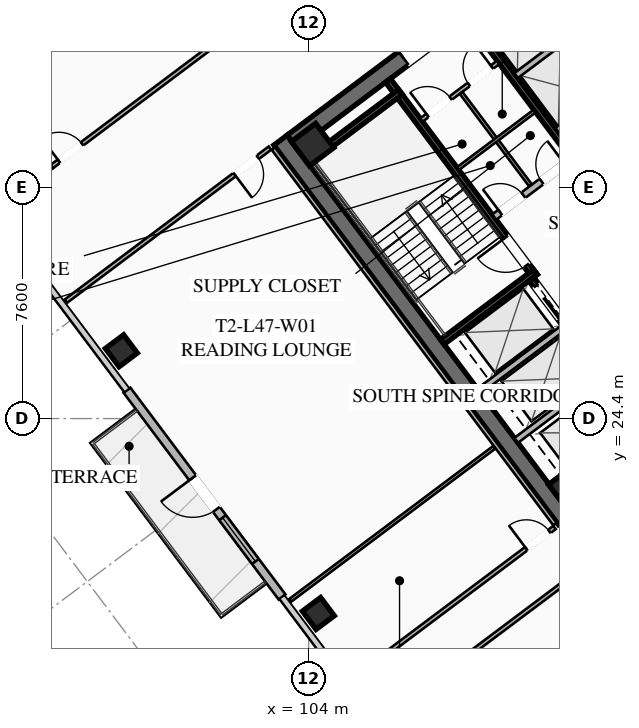
"""IFC4 building model, lengths in metres.
Left out: names, types, materials, properties, quantities, classifications, styles, units other than length and angle.
Written with IfcOpenShell. Run it as: python <this file> out.ifc"""

import sys

from ifc_helpers import new_model, si_unit, direction, frame, frame_2d, origin, origin_2d, place, context, subcontext, project, spatial, rectangle, hollow_rectangle, extrude, element, fill, save


model = new_model("IFC4")
c1 = context("Model", 3, precision=1e-05, world=origin(), true_north=direction((0.0, 1.0)))
c2 = subcontext(c1, "Body", "Model", "MODEL_VIEW")
j1 = project(units=[si_unit("LENGTHUNIT", "METRE"), si_unit("PLANEANGLEUNIT", "RADIAN")], contexts=[c1])
p1 = place(None, origin())
s1 = spatial("IfcSite", under=j1, at=p1, CompositionType="ELEMENT")
p2 = place(p1, origin())
s2 = spatial("IfcBuilding", under=s1, at=p2, CompositionType="ELEMENT")
p3 = place(p2, frame((0.0, 0.0, 174.75)))
s3 = spatial("IfcBuildingStorey", under=s2, at=p3, CompositionType="ELEMENT", Elevation=174.75)
p4 = place(p3, frame((112.436, 21.077, 0.0), z_axis=(0.0, 0.0, 1.0), x_axis=(-0.600005007985, 0.799996243986, 0.0)))
e1 = element("IfcWall", 1, at=p4, inside=s3, PredefinedType="SHEAR", context=c2, shape_type="SweptSolid", body=[
    extrude(rectangle(XDim=15.6, YDim=0.55, at=frame_2d((7.8, 0.0))), origin(), (0.0, 0.0, 1.0), 3.55),
])
p5 = place(p3, frame((103.461, 33.502, 0.0), z_axis=(0.0, 0.0, 1.0), x_axis=(0.799998054672, 0.600002593761, 0.0)))
e2 = element("IfcWall", 2, at=p5, inside=s3, PredefinedType="SHEAR", context=c2, shape_type="SweptSolid", body=[
    extrude(rectangle(XDim=15.06, YDim=0.55, at=frame_2d((7.53, 0.0))), origin(), (0.0, 0.0, 1.0), 3.55),
])
p6 = place(p5, frame((4.58, 0.0, 0.0)))
e3 = element("IfcOpeningElement", 3, at=p6, cuts=e2, PredefinedType="OPENING", context=c2, shape_type="SweptSolid", body=[
    extrude(rectangle(XDim=1.25, YDim=2.25, at=frame_2d((0.625, 1.125))), frame((0.0, 0.285, 0.0), z_axis=(0.0, -1.0, 0.0), x_axis=(1.0, 0.0, 0.0)), (0.0, 0.0, 1.0), 0.57),
])
p7 = place(p5, frame((9.63, 0.0, 0.0)))
e4 = element("IfcOpeningElement", 4, at=p7, cuts=e2, PredefinedType="OPENING", context=c2, shape_type="SweptSolid", body=[
    extrude(rectangle(XDim=1.25, YDim=2.25, at=frame_2d((0.625, 1.125))), frame((0.0, 0.285, 0.0), z_axis=(0.0, -1.0, 0.0), x_axis=(1.0, 0.0, 0.0)), (0.0, 0.0, 1.0), 0.57),
])
for number, where, z_axis, x_axis in (
    (5, (112.59, 22.13, 0.0), (0.0, 0.0, 1.0), (0.8, 0.6, 0.0)),
    (6, (104.13, 33.41, 0.0), (0.0, 0.0, 1.0), (0.8, 0.6, 0.0)),
):
    element("IfcColumn", number, at=place(p3, frame(where, z_axis=z_axis, x_axis=x_axis)), inside=s3, PredefinedType="COLUMN", context=c2, shape_type="SweptSolid", body=[
        extrude(hollow_rectangle(XDim=1.0, YDim=1.0, WallThickness=0.04, at=origin_2d()), origin(), (0.0, 0.0, 1.0), 3.37),
    ])
for number, where, z_axis, x_axis in (
    (7, (97.84, 26.63, 0.0), (0.0, 0.0, 1.0), (0.8, 0.6, 0.0)),
    (8, (104.32, 17.99, 0.0), (0.0, 0.0, 1.0), (0.8, 0.6, 0.0)),
):
    element("IfcColumn", number, at=place(p3, frame(where, z_axis=z_axis, x_axis=x_axis)), inside=s3, PredefinedType="COLUMN", context=c2, shape_type="SweptSolid", body=[
        extrude(hollow_rectangle(XDim=0.75, YDim=0.75, WallThickness=0.032, at=origin_2d()), origin(), (0.0, 0.0, 1.0), 3.37),
    ])
p8 = place(p3, frame((103.126, 18.532, 0.0), z_axis=(0.0, 0.0, 1.0), x_axis=(-0.600004595526, 0.799996553335, 0.0)))
e9 = element("IfcWall", 9, at=p8, inside=s3, PredefinedType="SOLIDWALL", context=c2, shape_type="SweptSolid", body=[
    extrude(rectangle(XDim=8.5, YDim=0.28, at=frame_2d((4.25, 0.0))), origin(), (0.0, 0.0, 1.0), 3.37),
])
p9 = place(p8, frame((3.6, 0.0, 0.0)))
e10 = element("IfcOpeningElement", 10, at=p9, cuts=e9, PredefinedType="OPENING", context=c2, shape_type="SweptSolid", body=[
    extrude(rectangle(XDim=1.3, YDim=2.15, at=frame_2d((0.65, 1.075))), frame((0.0, 0.15, 0.0), z_axis=(0.0, -1.0, 0.0), x_axis=(1.0, 0.0, 0.0)), (0.0, 0.0, 1.0), 0.3),
])
p10 = place(p8, frame((1.46, 0.0, 0.85)))
e11 = element("IfcOpeningElement", 11, at=p10, cuts=e9, PredefinedType="OPENING", context=c2, shape_type="SweptSolid", body=[
    extrude(rectangle(XDim=1.8, YDim=1.92, at=frame_2d((0.9, 0.96))), frame((0.0, 0.15, 0.0), z_axis=(0.0, -1.0, 0.0), x_axis=(1.0, 0.0, 0.0)), (0.0, 0.0, 1.0), 0.3),
])
p11 = place(p3, frame((111.44, 29.08, 0.0), z_axis=(0.0, 0.0, 1.0), x_axis=(-0.59999029481, 0.8000072788, 0.0)))
e12 = element("IfcWall", 12, at=p11, inside=s3, PredefinedType="SHEAR", context=c2, shape_type="SweptSolid", body=[
    extrude(rectangle(XDim=8.05, YDim=0.2, at=frame_2d((4.025, 0.0))), origin(), (0.0, 0.0, 1.0), 3.37),
])
p12 = place(p11, frame((0.45, 0.0, 0.0)))
e13 = element("IfcOpeningElement", 13, at=p12, cuts=e12, PredefinedType="OPENING", context=c2, shape_type="SweptSolid", body=[
    extrude(rectangle(XDim=1.15, YDim=2.2, at=frame_2d((0.575, 1.1))), frame((0.0, 0.11, 0.0), z_axis=(0.0, -1.0, 0.0), x_axis=(1.0, 0.0, 0.0)), (0.0, 0.0, 1.0), 0.22),
])
for number, where, z_axis, x_axis in (
    (14, (108.396, 26.922, 0.0), (0.0, 0.0, 1.0), (0.8, 0.6, 0.0)),
    (15, (103.956, 32.842, 0.0), (0.0, 0.0, 1.0), (0.8, 0.6, 0.0)),
):
    element("IfcWall", number, at=place(p3, frame(where, z_axis=z_axis, x_axis=x_axis)), inside=s3, PredefinedType="SHEAR", context=c2, shape_type="SweptSolid", body=[
        extrude(rectangle(XDim=3.83, YDim=0.2, at=frame_2d((1.915, 0.0))), origin(), (0.0, 0.0, 1.0), 3.37),
    ])
p13 = place(p3, frame((117.998, 25.936, 0.0), z_axis=(0.0, 0.0, 1.0), x_axis=(-0.600002693989, 0.799997979501, 0.0)))
e16 = element("IfcWall", 16, at=p13, inside=s3, PredefinedType="SHEAR", context=c2, shape_type="SweptSolid", body=[
    extrude(rectangle(XDim=14.5, YDim=0.2, at=frame_2d((7.25, 0.0))), origin(), (0.0, 0.0, 1.0), 3.37),
])
p14 = place(p3, frame((110.104, 31.028, 0.0), z_axis=(0.0, 0.0, 1.0), x_axis=(0.800018601094, 0.59997519774, 0.0)))
e17 = element("IfcWall", 17, at=p14, inside=s3, PredefinedType="SOLIDWALL", context=c2, shape_type="SweptSolid", body=[
    extrude(rectangle(XDim=3.15, YDim=0.22, at=frame_2d((1.575, 0.0))), origin(), (0.0, 0.0, 1.0), 2.723),
])
p15 = place(p14, frame((0.25, 0.0, 0.0)))
e18 = element("IfcOpeningElement", 18, at=p15, cuts=e17, PredefinedType="OPENING", context=c2, shape_type="SweptSolid", body=[
    extrude(rectangle(XDim=0.95, YDim=2.05, at=frame_2d((0.475, 1.025))), frame((0.0, 0.12, 0.0), z_axis=(0.0, -1.0, 0.0), x_axis=(1.0, 0.0, 0.0)), (0.0, 0.0, 1.0), 0.24),
])
p16 = place(p14, frame((1.95, 0.0, 0.0)))
e19 = element("IfcOpeningElement", 19, at=p16, cuts=e17, PredefinedType="OPENING", context=c2, shape_type="SweptSolid", body=[
    extrude(rectangle(XDim=0.95, YDim=2.05, at=frame_2d((0.475, 1.025))), frame((0.0, 0.12, 0.0), z_axis=(0.0, -1.0, 0.0), x_axis=(1.0, 0.0, 0.0)), (0.0, 0.0, 1.0), 0.24),
])
p17 = place(p3, frame((115.19, 23.83, 0.0), z_axis=(0.0, 0.0, 1.0), x_axis=(-0.599993943644, 0.800004542231, 0.0)))
e20 = element("IfcWall", 20, at=p17, inside=s3, PredefinedType="SHEAR", context=c2, shape_type="SweptSolid", body=[
    extrude(rectangle(XDim=6.45, YDim=0.2, at=frame_2d((3.225, 0.0))), origin(), (0.0, 0.0, 1.0), 3.37),
])
p18 = place(p17, frame((4.875, 0.0, 0.0)))
e21 = element("IfcOpeningElement", 21, at=p18, cuts=e20, PredefinedType="OPENING", context=c2, shape_type="SweptSolid", body=[
    extrude(rectangle(XDim=1.3, YDim=2.25, at=frame_2d((0.65, 1.125))), frame((0.0, 0.11, 0.0), z_axis=(0.0, -1.0, 0.0), x_axis=(1.0, 0.0, 0.0)), (0.0, 0.0, 1.0), 0.22),
])
p19 = place(p17, frame((2.875, 0.0, 0.0)))
e22 = element("IfcOpeningElement", 22, at=p19, cuts=e20, PredefinedType="OPENING", context=c2, shape_type="SweptSolid", body=[
    extrude(rectangle(XDim=1.3, YDim=2.25, at=frame_2d((0.65, 1.125))), frame((0.0, 0.11, 0.0), z_axis=(0.0, -1.0, 0.0), x_axis=(1.0, 0.0, 0.0)), (0.0, 0.0, 1.0), 0.22),
])
p20 = place(p17, frame((0.675, 0.0, 0.0)))
e23 = element("IfcOpeningElement", 23, at=p20, cuts=e20, PredefinedType="OPENING", context=c2, shape_type="SweptSolid", body=[
    extrude(rectangle(XDim=1.3, YDim=2.25, at=frame_2d((0.65, 1.125))), frame((0.0, 0.11, 0.0), z_axis=(0.0, -1.0, 0.0), x_axis=(1.0, 0.0, 0.0)), (0.0, 0.0, 1.0), 0.22),
])
for number, where, z_axis, x_axis in (
    (24, (110.826, 23.682, 0.0), (0.0, 0.0, 1.0), (0.8, 0.6, 0.0)),
    (25, (109.608, 25.306, 0.0), (0.0, 0.0, 1.0), (0.8, 0.6, 0.0)),
):
    element("IfcWall", number, at=place(p3, frame(where, z_axis=z_axis, x_axis=x_axis)), inside=s3, PredefinedType="SOLIDWALL", context=c2, shape_type="SweptSolid", body=[
        extrude(rectangle(XDim=3.48, YDim=0.2, at=frame_2d((1.74, 0.0))), origin(), (0.0, 0.0, 1.0), 3.37),
    ])
p21 = place(p3, frame((107.71, 34.22, 0.0), z_axis=(0.0, 0.0, 1.0), x_axis=(0.799981399002, 0.60002480053, 0.0)))
e26 = element("IfcWall", 26, at=p21, inside=s3, PredefinedType="PARTITIONING", context=c2, shape_type="SweptSolid", body=[
    extrude(rectangle(XDim=3.15, YDim=0.135, at=frame_2d((1.575, 0.0))), origin(), (0.0, 0.0, 1.0), 2.723),
])
p22 = place(p21, frame((0.25, 0.0, 0.0)))
e27 = element("IfcOpeningElement", 27, at=p22, cuts=e26, PredefinedType="OPENING", context=c2, shape_type="SweptSolid", body=[
    extrude(rectangle(XDim=0.95, YDim=2.05, at=frame_2d((0.475, 1.025))), frame((0.0, 0.077, 0.0), z_axis=(0.0, -1.0, 0.0), x_axis=(1.0, 0.0, 0.0)), (0.0, 0.0, 1.0), 0.155),
])
p23 = place(p21, frame((1.95, 0.0, 0.0)))
e28 = element("IfcOpeningElement", 28, at=p23, cuts=e26, PredefinedType="OPENING", context=c2, shape_type="SweptSolid", body=[
    extrude(rectangle(XDim=0.95, YDim=2.05, at=frame_2d((0.475, 1.025))), frame((0.0, 0.077, 0.0), z_axis=(0.0, -1.0, 0.0), x_axis=(1.0, 0.0, 0.0)), (0.0, 0.0, 1.0), 0.155),
])
p24 = place(p3, frame((111.296, 32.072, 0.0), z_axis=(0.0, 0.0, 1.0), x_axis=(-0.59995887973, 0.800030838552, 0.0)))
e29 = element("IfcWall", 29, at=p24, inside=s3, PredefinedType="PARTITIONING", context=c2, shape_type="SweptSolid", body=[
    extrude(rectangle(XDim=3.8, YDim=0.11, at=frame_2d((1.9, 0.0))), origin(), (0.0, 0.0, 1.0), 2.723),
])
p25 = place(p3, frame((108.91, 32.62, 0.0), z_axis=(0.0, 0.0, 1.0), x_axis=(0.800018601094, 0.59997519774, 0.0)))
e30 = element("IfcWall", 30, at=p25, inside=s3, PredefinedType="PARTITIONING", context=c2, shape_type="SweptSolid", body=[
    extrude(rectangle(XDim=3.15, YDim=0.11, at=frame_2d((1.575, 0.0))), origin(), (0.0, 0.0, 1.0), 2.723),
])
p26 = place(p3, frame((115.11, 33.27, 0.0), z_axis=(0.0, 0.0, 1.0), x_axis=(-0.600011322243, 0.799991508192, 0.0)))
e31 = element("IfcWall", 31, at=p26, inside=s3, PredefinedType="SOLIDWALL", context=c2, shape_type="SweptSolid", body=[
    extrude(rectangle(XDim=6.9, YDim=0.2, at=frame_2d((3.45, 0.0))), origin(), (0.0, 0.0, 1.0), 3.37),
])
p27 = place(p26, frame((0.575, 0.0, 0.0)))
e32 = element("IfcOpeningElement", 32, at=p27, cuts=e31, PredefinedType="OPENING", context=c2, shape_type="SweptSolid", body=[
    extrude(rectangle(XDim=1.1, YDim=2.2, at=frame_2d((0.55, 1.1))), frame((0.0, 0.11, 0.0), z_axis=(0.0, -1.0, 0.0), x_axis=(1.0, 0.0, 0.0)), (0.0, 0.0, 1.0), 0.22),
])
p28 = place(p26, frame((2.825, 0.0, 0.0)))
e33 = element("IfcOpeningElement", 33, at=p28, cuts=e31, PredefinedType="OPENING", context=c2, shape_type="SweptSolid", body=[
    extrude(rectangle(XDim=1.1, YDim=2.2, at=frame_2d((0.55, 1.1))), frame((0.0, 0.11, 0.0), z_axis=(0.0, -1.0, 0.0), x_axis=(1.0, 0.0, 0.0)), (0.0, 0.0, 1.0), 0.22),
])
p29 = place(p26, frame((5.075, 0.0, 0.0)))
e34 = element("IfcOpeningElement", 34, at=p29, cuts=e31, PredefinedType="OPENING", context=c2, shape_type="SweptSolid", body=[
    extrude(rectangle(XDim=1.1, YDim=2.2, at=frame_2d((0.55, 1.1))), frame((0.0, 0.11, 0.0), z_axis=(0.0, -1.0, 0.0), x_axis=(1.0, 0.0, 0.0)), (0.0, 0.0, 1.0), 0.22),
])
p30 = place(p3, frame((112.176, 33.882, 0.0), z_axis=(0.0, 0.0, 1.0), x_axis=(0.8, 0.6, 0.0)))
e35 = element("IfcWall", 35, at=p30, inside=s3, PredefinedType="SOLIDWALL", context=c2, shape_type="SweptSolid", body=[
    extrude(rectangle(XDim=1.88, YDim=0.2, at=frame_2d((0.94, 0.0))), origin(), (0.0, 0.0, 1.0), 3.37),
])
p31 = place(p3, frame((110.826, 35.682, 0.0), z_axis=(0.0, 0.0, 1.0), x_axis=(0.799984418148, 0.600020775241, 0.0)))
e36 = element("IfcWall", 36, at=p31, inside=s3, PredefinedType="SOLIDWALL", context=c2, shape_type="SweptSolid", body=[
    extrude(rectangle(XDim=1.88, YDim=0.2, at=frame_2d((0.94, 0.0))), origin(), (0.0, 0.0, 1.0), 3.37),
])
p32 = place(p3, frame((95.548, 32.686, 0.0), z_axis=(0.0, 0.0, 1.0), x_axis=(0.8, 0.6, 0.0)))
e37 = element("IfcWall", 37, at=p32, inside=s3, PredefinedType="PARTITIONING", context=c2, shape_type="SweptSolid", body=[
    extrude(rectangle(XDim=28.7, YDim=0.135, at=frame_2d((14.35, 0.0))), origin(), (0.0, 0.0, 1.0), 2.723),
])
p33 = place(p32, frame((0.3, 0.0, 0.0)))
e38 = element("IfcOpeningElement", 38, at=p33, cuts=e37, PredefinedType="OPENING", context=c2, shape_type="SweptSolid", body=[
    extrude(rectangle(XDim=0.95, YDim=2.05, at=frame_2d((0.475, 1.025))), frame((0.0, 0.077, 0.0), z_axis=(0.0, -1.0, 0.0), x_axis=(1.0, 0.0, 0.0)), (0.0, 0.0, 1.0), 0.155),
])
p34 = place(p32, frame((27.45, 0.0, 0.0)))
e39 = element("IfcOpeningElement", 39, at=p34, cuts=e37, PredefinedType="OPENING", context=c2, shape_type="SweptSolid", body=[
    extrude(rectangle(XDim=0.95, YDim=2.05, at=frame_2d((0.475, 1.025))), frame((0.0, 0.077, 0.0), z_axis=(0.0, -1.0, 0.0), x_axis=(1.0, 0.0, 0.0)), (0.0, 0.0, 1.0), 0.155),
])
p35 = place(p3, frame((93.604, 31.228, 0.0), z_axis=(0.0, 0.0, 1.0), x_axis=(0.800012055778, 0.599983925293, 0.0)))
e40 = element("IfcWall", 40, at=p35, inside=s3, PredefinedType="PARTITIONING", context=c2, shape_type="SweptSolid", body=[
    extrude(rectangle(XDim=2.43, YDim=0.135, at=frame_2d((1.215, 0.0))), origin(), (0.0, 0.0, 1.0), 2.723),
])
p36 = place(p3, frame((131.15, 33.05, 0.0), z_axis=(0.0, 0.0, 1.0), x_axis=(-0.8, -0.6, 0.0)))
e41 = element("IfcWall", 41, at=p36, inside=s3, PredefinedType="PARTITIONING", context=c2, shape_type="SweptSolid", body=[
    extrude(rectangle(XDim=28.7, YDim=0.135, at=frame_2d((14.35, 0.0))), origin(), (0.0, 0.0, 1.0), 2.723),
])
p37 = place(p36, frame((27.37, 0.0, 0.0)))
e42 = element("IfcOpeningElement", 42, at=p37, cuts=e41, PredefinedType="OPENING", context=c2, shape_type="SweptSolid", body=[
    extrude(rectangle(XDim=0.95, YDim=2.05, at=frame_2d((0.475, 1.025))), frame((0.0, 0.077, 0.0), z_axis=(0.0, -1.0, 0.0), x_axis=(1.0, 0.0, 0.0)), (0.0, 0.0, 1.0), 0.155),
])
p38 = place(p36, frame((17.851, 0.0, 0.0)))
e43 = element("IfcOpeningElement", 43, at=p38, cuts=e41, PredefinedType="OPENING", context=c2, shape_type="SweptSolid", body=[
    extrude(rectangle(XDim=0.95, YDim=2.05, at=frame_2d((0.475, 1.025))), frame((0.0, 0.077, 0.0), z_axis=(0.0, -1.0, 0.0), x_axis=(1.0, 0.0, 0.0)), (0.0, 0.0, 1.0), 0.155),
])
p39 = place(p36, frame((13.601, 0.0, 0.0)))
e44 = element("IfcOpeningElement", 44, at=p39, cuts=e41, PredefinedType="OPENING", context=c2, shape_type="SweptSolid", body=[
    extrude(rectangle(XDim=0.95, YDim=2.05, at=frame_2d((0.475, 1.025))), frame((0.0, 0.077, 0.0), z_axis=(0.0, -1.0, 0.0), x_axis=(1.0, 0.0, 0.0)), (0.0, 0.0, 1.0), 0.155),
])
p40 = place(p36, frame((9.62, 0.0, 0.0)))
e45 = element("IfcOpeningElement", 45, at=p40, cuts=e41, PredefinedType="OPENING", context=c2, shape_type="SweptSolid", body=[
    extrude(rectangle(XDim=0.95, YDim=2.05, at=frame_2d((0.475, 1.025))), frame((0.0, 0.077, 0.0), z_axis=(0.0, -1.0, 0.0), x_axis=(1.0, 0.0, 0.0)), (0.0, 0.0, 1.0), 0.155),
])
p41 = place(p36, frame((0.38, 0.0, 0.0)))
e46 = element("IfcOpeningElement", 46, at=p41, cuts=e41, PredefinedType="OPENING", context=c2, shape_type="SweptSolid", body=[
    extrude(rectangle(XDim=0.95, YDim=2.05, at=frame_2d((0.475, 1.025))), frame((0.0, 0.077, 0.0), z_axis=(0.0, -1.0, 0.0), x_axis=(1.0, 0.0, 0.0)), (0.0, 0.0, 1.0), 0.155),
])
p42 = place(p3, frame((112.104, 20.928, 0.0), z_axis=(0.0, 0.0, 1.0), x_axis=(-0.599994940075, 0.800003794918, 0.0)))
e47 = element("IfcWall", 47, at=p42, inside=s3, PredefinedType="PARTITIONING", context=c2, shape_type="SweptSolid", body=[
    extrude(rectangle(XDim=15.44, YDim=0.135, at=frame_2d((7.72, 0.0))), origin(), (0.0, 0.0, 1.0), 2.723),
])
p43 = place(p3, frame((102.728, 33.296, 0.0), z_axis=(0.0, 0.0, 1.0), x_axis=(-0.8, -0.6, 0.0)))
e48 = element("IfcWall", 48, at=p43, inside=s3, PredefinedType="PARTITIONING", context=c2, shape_type="SweptSolid", body=[
    extrude(rectangle(XDim=8.39, YDim=0.135, at=frame_2d((4.195, 0.0))), origin(), (0.0, 0.0, 1.0), 2.723),
])
p44 = place(p43, frame((0.5, 0.0, 0.0)))
e49 = element("IfcOpeningElement", 49, at=p44, cuts=e48, PredefinedType="OPENING", context=c2, shape_type="SweptSolid", body=[
    extrude(rectangle(XDim=0.95, YDim=2.05, at=frame_2d((0.475, 1.025))), frame((0.0, 0.077, 0.0), z_axis=(0.0, -1.0, 0.0), x_axis=(1.0, 0.0, 0.0)), (0.0, 0.0, 1.0), 0.155),
])
p45 = place(p3, frame((105.376, 15.782, 0.0), z_axis=(0.0, 0.0, 1.0), x_axis=(0.8, 0.6, 0.0)))
e50 = element("IfcWall", 50, at=p45, inside=s3, PredefinedType="PARTITIONING", context=c2, shape_type="SweptSolid", body=[
    extrude(rectangle(XDim=8.39, YDim=0.135, at=frame_2d((4.195, 0.0))), origin(), (0.0, 0.0, 1.0), 2.723),
])
p46 = place(p45, frame((7.23, 0.0, 0.0)))
e51 = element("IfcOpeningElement", 51, at=p46, cuts=e50, PredefinedType="OPENING", context=c2, shape_type="SweptSolid", body=[
    extrude(rectangle(XDim=0.95, YDim=2.05, at=frame_2d((0.475, 1.025))), frame((0.0, 0.077, 0.0), z_axis=(0.0, -1.0, 0.0), x_axis=(1.0, 0.0, 0.0)), (0.0, 0.0, 1.0), 0.155),
])
p47 = place(p3, frame((103.396, 18.422, 0.0), z_axis=(0.0, 0.0, 1.0), x_axis=(0.8, 0.6, 0.0)))
e52 = element("IfcWall", 52, at=p47, inside=s3, PredefinedType="PARTITIONING", context=c2, shape_type="SweptSolid", body=[
    extrude(rectangle(XDim=8.39, YDim=0.11, at=frame_2d((4.195, 0.0))), origin(), (0.0, 0.0, 1.0), 2.723),
])
p48 = place(p9, origin())
e53 = element("IfcDoor", 53, at=p48, inside=s3, OperationType="SINGLE_SWING_RIGHT", PredefinedType="DOOR", context=c2, shape_type="SweptSolid", body=[
    extrude(rectangle(XDim=1.3, YDim=2.15, at=frame_2d((0.65, 1.075))), frame((0.0, 0.025, 0.0), z_axis=(0.0, -1.0, 0.0), x_axis=(1.0, 0.0, 0.0)), (0.0, 0.0, 1.0), 0.05),
])
fill(e10, e53)
p49 = place(p10, origin())
e54 = element("IfcWindow", 54, at=p49, inside=s3, PartitioningType="SINGLE_PANEL", PredefinedType="WINDOW", context=c2, shape_type="SweptSolid", body=[
    extrude(rectangle(XDim=1.8, YDim=1.92, at=frame_2d((0.9, 0.96))), frame((0.0, 0.03, 0.0), z_axis=(0.0, -1.0, 0.0), x_axis=(1.0, 0.0, 0.0)), (0.0, 0.0, 1.0), 0.06),
])
fill(e11, e54)
p50 = place(p6, origin())
e55 = element("IfcDoor", 55, at=p50, inside=s3, OperationType="SINGLE_SWING_LEFT", PredefinedType="DOOR", context=c2, shape_type="SweptSolid", body=[
    extrude(rectangle(XDim=1.25, YDim=2.25, at=frame_2d((0.625, 1.125))), frame((0.0, 0.025, 0.0), z_axis=(0.0, -1.0, 0.0), x_axis=(1.0, 0.0, 0.0)), (0.0, 0.0, 1.0), 0.05),
])
fill(e3, e55)
p51 = place(p12, origin())
e56 = element("IfcDoor", 56, at=p51, inside=s3, OperationType="SINGLE_SWING_RIGHT", PredefinedType="DOOR", context=c2, shape_type="SweptSolid", body=[
    extrude(rectangle(XDim=1.15, YDim=2.2, at=frame_2d((0.575, 1.1))), frame((0.0, 0.025, 0.0), z_axis=(0.0, -1.0, 0.0), x_axis=(1.0, 0.0, 0.0)), (0.0, 0.0, 1.0), 0.05),
])
fill(e13, e56)
p52 = place(p22, origin())
e57 = element("IfcDoor", 57, at=p52, inside=s3, OperationType="SINGLE_SWING_LEFT", PredefinedType="DOOR", context=c2, shape_type="SweptSolid", body=[
    extrude(rectangle(XDim=0.95, YDim=2.05, at=frame_2d((0.475, 1.025))), frame((0.0, 0.025, 0.0), z_axis=(0.0, -1.0, 0.0), x_axis=(1.0, 0.0, 0.0)), (0.0, 0.0, 1.0), 0.05),
])
fill(e27, e57)
p53 = place(p23, origin())
e58 = element("IfcDoor", 58, at=p53, inside=s3, OperationType="SINGLE_SWING_RIGHT", PredefinedType="DOOR", context=c2, shape_type="SweptSolid", body=[
    extrude(rectangle(XDim=0.95, YDim=2.05, at=frame_2d((0.475, 1.025))), frame((0.0, 0.025, 0.0), z_axis=(0.0, -1.0, 0.0), x_axis=(1.0, 0.0, 0.0)), (0.0, 0.0, 1.0), 0.05),
])
fill(e28, e58)
p54 = place(p15, origin())
e59 = element("IfcDoor", 59, at=p54, inside=s3, OperationType="SINGLE_SWING_LEFT", PredefinedType="DOOR", context=c2, shape_type="SweptSolid", body=[
    extrude(rectangle(XDim=0.95, YDim=2.05, at=frame_2d((0.475, 1.025))), frame((0.0, 0.025, 0.0), z_axis=(0.0, -1.0, 0.0), x_axis=(1.0, 0.0, 0.0)), (0.0, 0.0, 1.0), 0.05),
])
fill(e18, e59)
p55 = place(p16, origin())
e60 = element("IfcDoor", 60, at=p55, inside=s3, OperationType="SINGLE_SWING_RIGHT", PredefinedType="DOOR", context=c2, shape_type="SweptSolid", body=[
    extrude(rectangle(XDim=0.95, YDim=2.05, at=frame_2d((0.475, 1.025))), frame((0.0, 0.025, 0.0), z_axis=(0.0, -1.0, 0.0), x_axis=(1.0, 0.0, 0.0)), (0.0, 0.0, 1.0), 0.05),
])
fill(e19, e60)
p56 = place(p33, origin())
e61 = element("IfcDoor", 61, at=p56, inside=s3, OperationType="SINGLE_SWING_LEFT", PredefinedType="DOOR", context=c2, shape_type="SweptSolid", body=[
    extrude(rectangle(XDim=0.95, YDim=2.05, at=frame_2d((0.475, 1.025))), frame((0.0, 0.025, 0.0), z_axis=(0.0, -1.0, 0.0), x_axis=(1.0, 0.0, 0.0)), (0.0, 0.0, 1.0), 0.05),
])
fill(e38, e61)
p57 = place(p44, origin())
e62 = element("IfcDoor", 62, at=p57, inside=s3, OperationType="SINGLE_SWING_RIGHT", PredefinedType="DOOR", context=c2, shape_type="SweptSolid", body=[
    extrude(rectangle(XDim=0.95, YDim=2.05, at=frame_2d((0.475, 1.025))), frame((0.0, 0.025, 0.0), z_axis=(0.0, -1.0, 0.0), x_axis=(1.0, 0.0, 0.0)), (0.0, 0.0, 1.0), 0.05),
])
fill(e49, e62)
p58 = place(p46, origin())
e63 = element("IfcDoor", 63, at=p58, inside=s3, OperationType="SINGLE_SWING_LEFT", PredefinedType="DOOR", context=c2, shape_type="SweptSolid", body=[
    extrude(rectangle(XDim=0.95, YDim=2.05, at=frame_2d((0.475, 1.025))), frame((0.0, 0.025, 0.0), z_axis=(0.0, -1.0, 0.0), x_axis=(1.0, 0.0, 0.0)), (0.0, 0.0, 1.0), 0.05),
])
fill(e51, e63)
p59 = place(p18, origin())
e64 = element("IfcDoor", 64, at=p59, inside=s3, OperationType="SLIDING_TO_LEFT", PredefinedType="DOOR", context=c2, shape_type="SweptSolid", body=[
    extrude(rectangle(XDim=1.3, YDim=2.25, at=frame_2d((0.65, 1.125))), frame((0.0, 0.025, 0.0), z_axis=(0.0, -1.0, 0.0), x_axis=(1.0, 0.0, 0.0)), (0.0, 0.0, 1.0), 0.05),
])
fill(e21, e64)
save(model, sys.argv[1])
